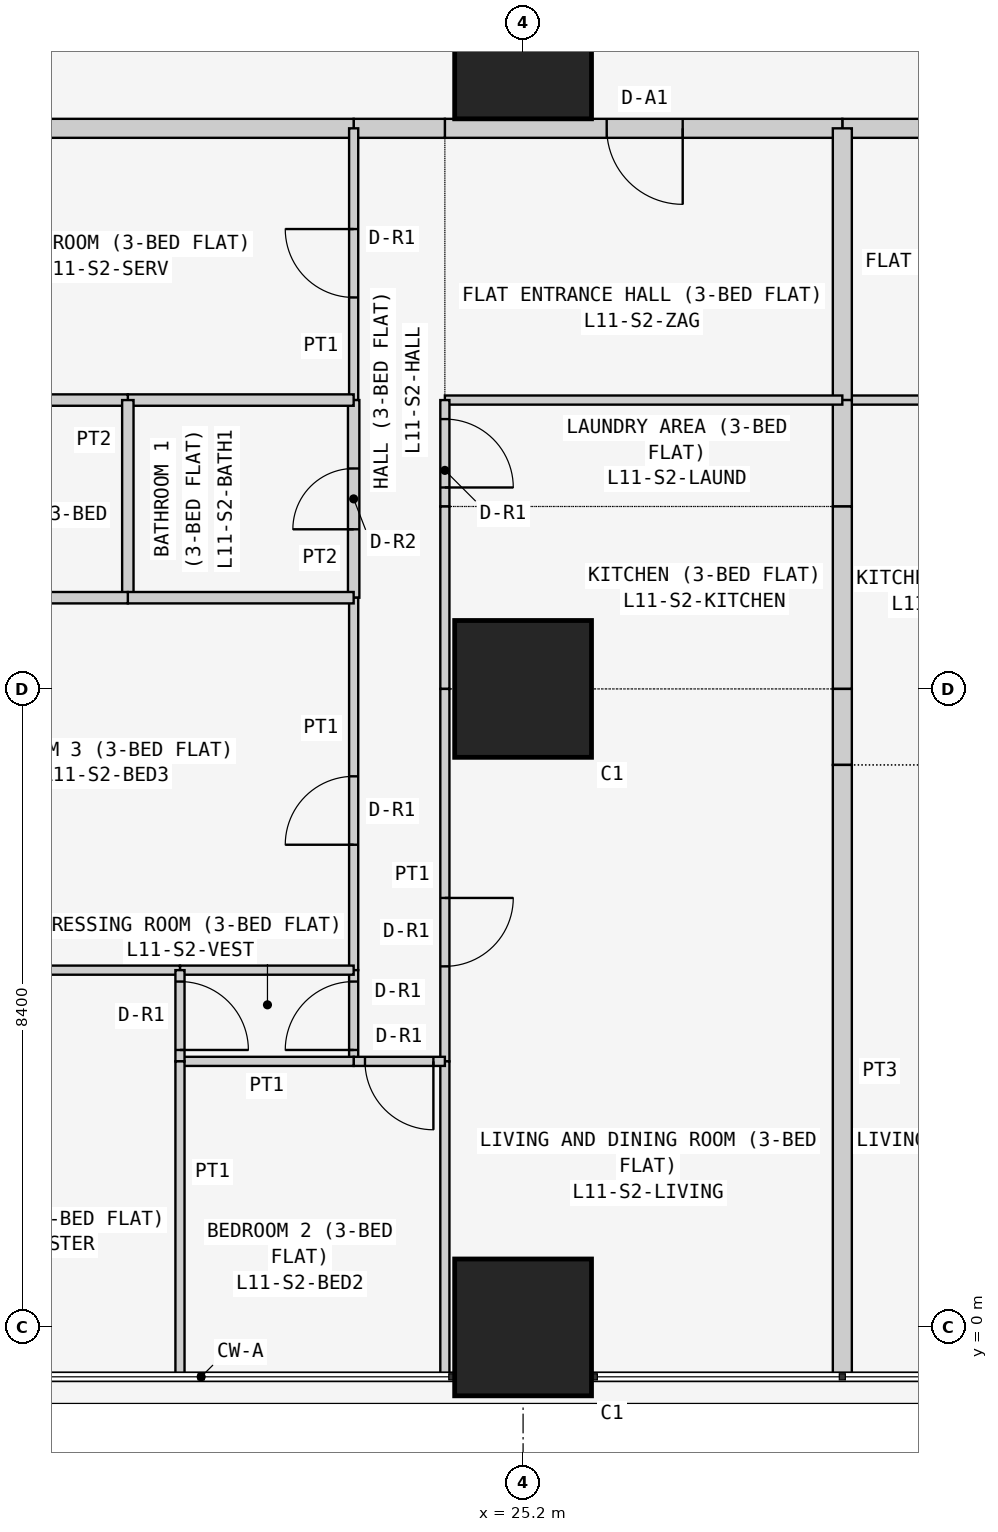
"""IFC4 building model, lengths in metres.
Left out: names, types, materials, properties, quantities, classifications, styles, units other than length and angle.
Written with IfcOpenShell. Run it as: python <this file> out.ifc"""

import sys

from ifc_helpers import new_model, si_unit, direction, frame, frame_2d, origin, origin_2d, place, context, subcontext, project, spatial, rectangle, extrude, element, fill, save


model = new_model("IFC4")
c1 = context("Model", 3, precision=1e-05, world=origin(), true_north=direction((0.0, 1.0)))
c2 = subcontext(c1, "Body", "Model", "MODEL_VIEW")
j1 = project(units=[si_unit("LENGTHUNIT", "METRE"), si_unit("PLANEANGLEUNIT", "RADIAN")], contexts=[c1])
p1 = place(None, origin())
s1 = spatial("IfcSite", under=j1, at=p1, CompositionType="ELEMENT")
p2 = place(p1, origin())
s2 = spatial("IfcBuilding", under=s1, at=p2, CompositionType="ELEMENT")
p3 = place(p2, frame((0.0, 0.0, 48.9)))
s3 = spatial("IfcBuildingStorey", under=s2, at=p3, CompositionType="ELEMENT", Elevation=48.9)
for number, where, z_axis, x_axis in (
    (1, (25.2, 0.0, 0.0), (0.0, 0.0, 1.0), (1.0, 0.0, 0.0)),
    (2, (25.2, 8.4, 0.0), (0.0, 0.0, 1.0), (1.0, 0.0, 0.0)),
    (3, (25.2, 16.8, 0.0), (0.0, 0.0, 1.0), (1.0, 0.0, 0.0)),
):
    element("IfcColumn", number, at=place(p3, frame(where, z_axis=z_axis, x_axis=x_axis)), inside=s3, PredefinedType="COLUMN", context=c2, shape_type="SweptSolid", body=[
        extrude(rectangle(XDim=1.8, YDim=1.8, at=origin_2d()), origin(), (0.0, 0.0, 1.0), 3.6),
    ])
p4 = place(p3, frame((34.629, 15.775, 0.0), z_axis=(0.0, 0.0, 1.0), x_axis=(-1.0, 0.0, 0.0)))
e4 = element("IfcWall", 4, at=p4, inside=s3, PredefinedType="PARTITIONING", context=c2, shape_type="SweptSolid", body=[
    extrude(rectangle(XDim=5.229, YDim=0.25, at=frame_2d((2.615, 0.0))), origin(), (0.0, 0.0, 1.0), 3.45),
])
p5 = place(p4, frame((2.129, 0.0, 0.0)))
e5 = element("IfcOpeningElement", 5, at=p5, cuts=e4, PredefinedType="OPENING", context=c2, shape_type="SweptSolid", body=[
    extrude(rectangle(XDim=1.0, YDim=2.1, at=frame_2d((0.5, 1.05))), frame((0.0, 0.135, 0.0), z_axis=(0.0, -1.0, 0.0), x_axis=(1.0, 0.0, 0.0)), (0.0, 0.0, 1.0), 0.27),
])
p6 = place(p3, frame((29.4, 15.775, 0.0), z_axis=(0.0, 0.0, 1.0), x_axis=(-1.0, 0.0, 0.0)))
e6 = element("IfcWall", 6, at=p6, inside=s3, PredefinedType="PARTITIONING", context=c2, shape_type="SweptSolid", body=[
    extrude(rectangle(XDim=5.229, YDim=0.25, at=frame_2d((2.615, 0.0))), origin(), (0.0, 0.0, 1.0), 3.45),
])
p7 = place(p6, frame((2.1, 0.0, 0.0)))
e7 = element("IfcOpeningElement", 7, at=p7, cuts=e6, PredefinedType="OPENING", context=c2, shape_type="SweptSolid", body=[
    extrude(rectangle(XDim=1.0, YDim=2.1, at=frame_2d((0.5, 1.05))), frame((0.0, 0.135, 0.0), z_axis=(0.0, -1.0, 0.0), x_axis=(1.0, 0.0, 0.0)), (0.0, 0.0, 1.0), 0.27),
])
p8 = place(p3, frame((24.171, 15.775, 0.0), z_axis=(0.0, 0.0, 1.0), x_axis=(-1.0, 0.0, 0.0)))
e8 = element("IfcWall", 8, at=p8, inside=s3, PredefinedType="PARTITIONING", context=c2, shape_type="SweptSolid", body=[
    extrude(rectangle(XDim=1.2, YDim=0.25, at=frame_2d((0.6, 0.0))), origin(), (0.0, 0.0, 1.0), 3.45),
])
p9 = place(p3, frame((22.971, 15.775, 0.0), z_axis=(0.0, 0.0, 1.0), x_axis=(-1.0, 0.0, 0.0)))
e9 = element("IfcWall", 9, at=p9, inside=s3, PredefinedType="PARTITIONING", context=c2, shape_type="SweptSolid", body=[
    extrude(rectangle(XDim=6.871, YDim=0.25, at=frame_2d((3.436, 0.0))), origin(), (0.0, 0.0, 1.0), 3.45),
])
p10 = place(p3, frame((29.4, 12.2, 0.0), z_axis=(0.0, 0.0, 1.0), x_axis=(1.0, 0.0, 0.0)))
e10 = element("IfcWall", 10, at=p10, inside=s3, PredefinedType="PARTITIONING", context=c2, shape_type="SweptSolid", body=[
    extrude(rectangle(XDim=5.229, YDim=0.12, at=frame_2d((2.615, 0.0))), origin(), (0.0, 0.0, 1.0), 3.45),
])
p11 = place(p10, frame((1.05, 0.0, 0.0)))
e11 = element("IfcOpeningElement", 11, at=p11, cuts=e10, PredefinedType="OPENING", context=c2, shape_type="SweptSolid", body=[
    extrude(rectangle(XDim=0.9, YDim=2.1, at=frame_2d((0.45, 1.05))), frame((0.0, 0.07, 0.0), z_axis=(0.0, -1.0, 0.0), x_axis=(1.0, 0.0, 0.0)), (0.0, 0.0, 1.0), 0.14),
])
p12 = place(p3, frame((29.4, 15.775, 0.0), z_axis=(0.0, 0.0, 1.0), x_axis=(0.0, -1.0, 0.0)))
e12 = element("IfcWall", 12, at=p12, inside=s3, PredefinedType="PARTITIONING", context=c2, shape_type="SweptSolid", body=[
    extrude(rectangle(XDim=3.575, YDim=0.25, at=frame_2d((1.788, 0.0))), origin(), (0.0, 0.0, 1.0), 2.848),
])
p13 = place(p3, frame((29.4, 12.2, 0.0), z_axis=(0.0, 0.0, 1.0), x_axis=(0.0, -1.0, 0.0)))
e13 = element("IfcWall", 13, at=p13, inside=s3, PredefinedType="PARTITIONING", context=c2, shape_type="SweptSolid", body=[
    extrude(rectangle(XDim=1.4, YDim=0.25, at=frame_2d((0.7, 0.0))), origin(), (0.0, 0.0, 1.0), 2.848),
])
p14 = place(p3, frame((29.4, 10.8, 0.0), z_axis=(0.0, 0.0, 1.0), x_axis=(0.0, -1.0, 0.0)))
e14 = element("IfcWall", 14, at=p14, inside=s3, PredefinedType="PARTITIONING", context=c2, shape_type="SweptSolid", body=[
    extrude(rectangle(XDim=2.4, YDim=0.25, at=frame_2d((1.2, 0.0))), origin(), (0.0, 0.0, 1.0), 2.848),
])
p15 = place(p3, frame((29.4, 8.4, 0.0), z_axis=(0.0, 0.0, 1.0), x_axis=(0.0, -1.0, 0.0)))
e15 = element("IfcWall", 15, at=p15, inside=s3, PredefinedType="PARTITIONING", context=c2, shape_type="SweptSolid", body=[
    extrude(rectangle(XDim=1.0, YDim=0.25, at=frame_2d((0.5, 0.0))), origin(), (0.0, 0.0, 1.0), 2.848),
])
p16 = place(p3, frame((29.4, 7.4, 0.0), z_axis=(0.0, 0.0, 1.0), x_axis=(0.0, -1.0, 0.0)))
e16 = element("IfcWall", 16, at=p16, inside=s3, PredefinedType="PARTITIONING", context=c2, shape_type="SweptSolid", body=[
    extrude(rectangle(XDim=8.05, YDim=0.25, at=frame_2d((4.025, 0.0))), origin(), (0.0, 0.0, 1.0), 2.848),
])
p17 = place(p3, frame((29.4, 12.2, 0.0), z_axis=(0.0, 0.0, 1.0), x_axis=(-1.0, 0.0, 0.0)))
e17 = element("IfcWall", 17, at=p17, inside=s3, PredefinedType="PARTITIONING", context=c2, shape_type="SweptSolid", body=[
    extrude(rectangle(XDim=5.229, YDim=0.12, at=frame_2d((2.615, 0.0))), origin(), (0.0, 0.0, 1.0), 3.45),
])
p18 = place(p3, frame((24.171, 10.8, 0.0), z_axis=(0.0, 0.0, 1.0), x_axis=(0.0, 1.0, 0.0)))
e18 = element("IfcWall", 18, at=p18, inside=s3, PredefinedType="PARTITIONING", context=c2, shape_type="SweptSolid", body=[
    extrude(rectangle(XDim=1.4, YDim=0.12, at=frame_2d((0.7, 0.0))), origin(), (0.0, 0.0, 1.0), 3.45),
])
p19 = place(p18, frame((0.25, 0.0, 0.0)))
e19 = element("IfcOpeningElement", 19, at=p19, cuts=e18, PredefinedType="OPENING", context=c2, shape_type="SweptSolid", body=[
    extrude(rectangle(XDim=0.9, YDim=2.1, at=frame_2d((0.45, 1.05))), frame((0.0, 0.07, 0.0), z_axis=(0.0, -1.0, 0.0), x_axis=(1.0, 0.0, 0.0)), (0.0, 0.0, 1.0), 0.14),
])
p20 = place(p3, frame((24.171, 8.4, 0.0), z_axis=(0.0, 0.0, 1.0), x_axis=(0.0, 1.0, 0.0)))
e20 = element("IfcWall", 20, at=p20, inside=s3, PredefinedType="PARTITIONING", context=c2, shape_type="SweptSolid", body=[
    extrude(rectangle(XDim=2.4, YDim=0.12, at=frame_2d((1.2, 0.0))), origin(), (0.0, 0.0, 1.0), 3.45),
])
p21 = place(p3, frame((24.171, 3.5, 0.0), z_axis=(0.0, 0.0, 1.0), x_axis=(0.0, 1.0, 0.0)))
e21 = element("IfcWall", 21, at=p21, inside=s3, PredefinedType="PARTITIONING", context=c2, shape_type="SweptSolid", body=[
    extrude(rectangle(XDim=4.9, YDim=0.12, at=frame_2d((2.45, 0.0))), origin(), (0.0, 0.0, 1.0), 3.45),
])
p22 = place(p21, frame((1.25, 0.0, 0.0)))
e22 = element("IfcOpeningElement", 22, at=p22, cuts=e21, PredefinedType="OPENING", context=c2, shape_type="SweptSolid", body=[
    extrude(rectangle(XDim=0.9, YDim=2.1, at=frame_2d((0.45, 1.05))), frame((0.0, 0.07, 0.0), z_axis=(0.0, -1.0, 0.0), x_axis=(1.0, 0.0, 0.0)), (0.0, 0.0, 1.0), 0.14),
])
p23 = place(p3, frame((24.171, -0.65, 0.0), z_axis=(0.0, 0.0, 1.0), x_axis=(0.0, 1.0, 0.0)))
e23 = element("IfcWall", 23, at=p23, inside=s3, PredefinedType="PARTITIONING", context=c2, shape_type="SweptSolid", body=[
    extrude(rectangle(XDim=4.15, YDim=0.12, at=frame_2d((2.075, 0.0))), origin(), (0.0, 0.0, 1.0), 3.45),
])
p24 = place(p3, frame((22.971, 12.2, 0.0), z_axis=(0.0, 0.0, 1.0), x_axis=(0.0, 1.0, 0.0)))
e24 = element("IfcWall", 24, at=p24, inside=s3, PredefinedType="PARTITIONING", context=c2, shape_type="SweptSolid", body=[
    extrude(rectangle(XDim=3.575, YDim=0.12, at=frame_2d((1.788, 0.0))), origin(), (0.0, 0.0, 1.0), 3.45),
])
p25 = place(p24, frame((1.35, 0.0, 0.0)))
e25 = element("IfcOpeningElement", 25, at=p25, cuts=e24, PredefinedType="OPENING", context=c2, shape_type="SweptSolid", body=[
    extrude(rectangle(XDim=0.9, YDim=2.1, at=frame_2d((0.45, 1.05))), frame((0.0, 0.07, 0.0), z_axis=(0.0, -1.0, 0.0), x_axis=(1.0, 0.0, 0.0)), (0.0, 0.0, 1.0), 0.14),
])
p26 = place(p3, frame((22.971, 9.6, 0.0), z_axis=(0.0, 0.0, 1.0), x_axis=(0.0, 1.0, 0.0)))
e26 = element("IfcWall", 26, at=p26, inside=s3, PredefinedType="PARTITIONING", context=c2, shape_type="SweptSolid", body=[
    extrude(rectangle(XDim=2.6, YDim=0.15, at=frame_2d((1.3, 0.0))), origin(), (0.0, 0.0, 1.0), 3.45),
])
p27 = place(p26, frame((0.9, 0.0, 0.0)))
e27 = element("IfcOpeningElement", 27, at=p27, cuts=e26, PredefinedType="OPENING", context=c2, shape_type="SweptSolid", body=[
    extrude(rectangle(XDim=0.8, YDim=2.1, at=frame_2d((0.4, 1.05))), frame((0.0, 0.085, 0.0), z_axis=(0.0, -1.0, 0.0), x_axis=(1.0, 0.0, 0.0)), (0.0, 0.0, 1.0), 0.17),
])
p28 = place(p3, frame((22.971, 4.7, 0.0), z_axis=(0.0, 0.0, 1.0), x_axis=(0.0, 1.0, 0.0)))
e28 = element("IfcWall", 28, at=p28, inside=s3, PredefinedType="PARTITIONING", context=c2, shape_type="SweptSolid", body=[
    extrude(rectangle(XDim=4.9, YDim=0.12, at=frame_2d((2.45, 0.0))), origin(), (0.0, 0.0, 1.0), 3.45),
])
p29 = place(p28, frame((1.65, 0.0, 0.0)))
e29 = element("IfcOpeningElement", 29, at=p29, cuts=e28, PredefinedType="OPENING", context=c2, shape_type="SweptSolid", body=[
    extrude(rectangle(XDim=0.9, YDim=2.1, at=frame_2d((0.45, 1.05))), frame((0.0, 0.07, 0.0), z_axis=(0.0, -1.0, 0.0), x_axis=(1.0, 0.0, 0.0)), (0.0, 0.0, 1.0), 0.14),
])
p30 = place(p3, frame((22.971, 3.5, 0.0), z_axis=(0.0, 0.0, 1.0), x_axis=(0.0, 1.0, 0.0)))
e30 = element("IfcWall", 30, at=p30, inside=s3, PredefinedType="PARTITIONING", context=c2, shape_type="SweptSolid", body=[
    extrude(rectangle(XDim=1.2, YDim=0.12, at=frame_2d((0.6, 0.0))), origin(), (0.0, 0.0, 1.0), 3.45),
])
p31 = place(p30, frame((0.15, 0.0, 0.0)))
e31 = element("IfcOpeningElement", 31, at=p31, cuts=e30, PredefinedType="OPENING", context=c2, shape_type="SweptSolid", body=[
    extrude(rectangle(XDim=0.9, YDim=2.1, at=frame_2d((0.45, 1.05))), frame((0.0, 0.07, 0.0), z_axis=(0.0, -1.0, 0.0), x_axis=(1.0, 0.0, 0.0)), (0.0, 0.0, 1.0), 0.14),
])
p32 = place(p3, frame((24.171, 3.5, 0.0), z_axis=(0.0, 0.0, 1.0), x_axis=(-1.0, 0.0, 0.0)))
e32 = element("IfcWall", 32, at=p32, inside=s3, PredefinedType="PARTITIONING", context=c2, shape_type="SweptSolid", body=[
    extrude(rectangle(XDim=1.2, YDim=0.12, at=frame_2d((0.6, 0.0))), origin(), (0.0, 0.0, 1.0), 3.45),
])
p33 = place(p32, frame((0.151, 0.0, 0.0)))
e33 = element("IfcOpeningElement", 33, at=p33, cuts=e32, PredefinedType="OPENING", context=c2, shape_type="SweptSolid", body=[
    extrude(rectangle(XDim=0.9, YDim=2.1, at=frame_2d((0.45, 1.05))), frame((0.0, 0.07, 0.0), z_axis=(0.0, -1.0, 0.0), x_axis=(1.0, 0.0, 0.0)), (0.0, 0.0, 1.0), 0.14),
])
p34 = place(p3, frame((22.971, 12.2, 0.0), z_axis=(0.0, 0.0, 1.0), x_axis=(-1.0, 0.0, 0.0)))
e34 = element("IfcWall", 34, at=p34, inside=s3, PredefinedType="PARTITIONING", context=c2, shape_type="SweptSolid", body=[
    extrude(rectangle(XDim=2.971, YDim=0.15, at=frame_2d((1.485, 0.0))), origin(), (0.0, 0.0, 1.0), 3.45),
])
p35 = place(p3, frame((20.0, 12.2, 0.0), z_axis=(0.0, 0.0, 1.0), x_axis=(-1.0, 0.0, 0.0)))
e35 = element("IfcWall", 35, at=p35, inside=s3, PredefinedType="PARTITIONING", context=c2, shape_type="SweptSolid", body=[
    extrude(rectangle(XDim=3.9, YDim=0.15, at=frame_2d((1.95, 0.0))), origin(), (0.0, 0.0, 1.0), 3.45),
])
p36 = place(p35, frame((1.45, 0.0, 0.0)))
e36 = element("IfcOpeningElement", 36, at=p36, cuts=e35, PredefinedType="OPENING", context=c2, shape_type="SweptSolid", body=[
    extrude(rectangle(XDim=0.8, YDim=2.1, at=frame_2d((0.4, 1.05))), frame((0.0, 0.085, 0.0), z_axis=(0.0, -1.0, 0.0), x_axis=(1.0, 0.0, 0.0)), (0.0, 0.0, 1.0), 0.17),
])
p37 = place(p3, frame((20.0, 9.6, 0.0), z_axis=(0.0, 0.0, 1.0), x_axis=(0.0, 1.0, 0.0)))
e37 = element("IfcWall", 37, at=p37, inside=s3, PredefinedType="PARTITIONING", context=c2, shape_type="SweptSolid", body=[
    extrude(rectangle(XDim=2.6, YDim=0.15, at=frame_2d((1.3, 0.0))), origin(), (0.0, 0.0, 1.0), 3.45),
])
p38 = place(p3, frame((22.971, 9.6, 0.0), z_axis=(0.0, 0.0, 1.0), x_axis=(-1.0, 0.0, 0.0)))
e38 = element("IfcWall", 38, at=p38, inside=s3, PredefinedType="PARTITIONING", context=c2, shape_type="SweptSolid", body=[
    extrude(rectangle(XDim=2.971, YDim=0.15, at=frame_2d((1.485, 0.0))), origin(), (0.0, 0.0, 1.0), 3.45),
])
p39 = place(p3, frame((20.0, 9.6, 0.0), z_axis=(0.0, 0.0, 1.0), x_axis=(-1.0, 0.0, 0.0)))
e39 = element("IfcWall", 39, at=p39, inside=s3, PredefinedType="PARTITIONING", context=c2, shape_type="SweptSolid", body=[
    extrude(rectangle(XDim=3.9, YDim=0.15, at=frame_2d((1.95, 0.0))), origin(), (0.0, 0.0, 1.0), 3.45),
])
p40 = place(p3, frame((22.971, 4.7, 0.0), z_axis=(0.0, 0.0, 1.0), x_axis=(-1.0, 0.0, 0.0)))
e40 = element("IfcWall", 40, at=p40, inside=s3, PredefinedType="PARTITIONING", context=c2, shape_type="SweptSolid", body=[
    extrude(rectangle(XDim=2.285, YDim=0.12, at=frame_2d((1.143, 0.0))), origin(), (0.0, 0.0, 1.0), 3.45),
])
p41 = place(p3, frame((20.686, 4.7, 0.0), z_axis=(0.0, 0.0, 1.0), x_axis=(-1.0, 0.0, 0.0)))
e41 = element("IfcWall", 41, at=p41, inside=s3, PredefinedType="PARTITIONING", context=c2, shape_type="SweptSolid", body=[
    extrude(rectangle(XDim=4.586, YDim=0.12, at=frame_2d((2.293, 0.0))), origin(), (0.0, 0.0, 1.0), 3.45),
])
p42 = place(p3, frame((22.971, 3.5, 0.0), z_axis=(0.0, 0.0, 1.0), x_axis=(-1.0, 0.0, 0.0)))
e42 = element("IfcWall", 42, at=p42, inside=s3, PredefinedType="PARTITIONING", context=c2, shape_type="SweptSolid", body=[
    extrude(rectangle(XDim=2.285, YDim=0.12, at=frame_2d((1.143, 0.0))), origin(), (0.0, 0.0, 1.0), 3.45),
])
p43 = place(p3, frame((20.686, 3.5, 0.0), z_axis=(0.0, 0.0, 1.0), x_axis=(0.0, 1.0, 0.0)))
e43 = element("IfcWall", 43, at=p43, inside=s3, PredefinedType="PARTITIONING", context=c2, shape_type="SweptSolid", body=[
    extrude(rectangle(XDim=1.2, YDim=0.12, at=frame_2d((0.6, 0.0))), origin(), (0.0, 0.0, 1.0), 3.45),
])
p44 = place(p43, frame((0.15, 0.0, 0.0)))
e44 = element("IfcOpeningElement", 44, at=p44, cuts=e43, PredefinedType="OPENING", context=c2, shape_type="SweptSolid", body=[
    extrude(rectangle(XDim=0.9, YDim=2.1, at=frame_2d((0.45, 1.05))), frame((0.0, 0.07, 0.0), z_axis=(0.0, -1.0, 0.0), x_axis=(1.0, 0.0, 0.0)), (0.0, 0.0, 1.0), 0.14),
])
p45 = place(p3, frame((20.686, -0.65, 0.0), z_axis=(0.0, 0.0, 1.0), x_axis=(0.0, 1.0, 0.0)))
e45 = element("IfcWall", 45, at=p45, inside=s3, PredefinedType="PARTITIONING", context=c2, shape_type="SweptSolid", body=[
    extrude(rectangle(XDim=4.15, YDim=0.12, at=frame_2d((2.075, 0.0))), origin(), (0.0, 0.0, 1.0), 3.45),
])
p46 = place(p7, origin())
e46 = element("IfcDoor", 46, at=p46, inside=s3, OperationType="SINGLE_SWING_LEFT", PredefinedType="DOOR", context=c2, shape_type="SweptSolid", body=[
    extrude(rectangle(XDim=1.0, YDim=2.1, at=frame_2d((0.5, 1.05))), frame((0.0, 0.025, 0.0), z_axis=(0.0, -1.0, 0.0), x_axis=(1.0, 0.0, 0.0)), (0.0, 0.0, 1.0), 0.05),
])
fill(e7, e46)
p47 = place(p19, frame((0.9, 0.0, 0.0), z_axis=(0.0, 0.0, 1.0), x_axis=(-1.0, 0.0, 0.0)))
e47 = element("IfcDoor", 47, at=p47, inside=s3, OperationType="SINGLE_SWING_RIGHT", PredefinedType="DOOR", context=c2, shape_type="SweptSolid", body=[
    extrude(rectangle(XDim=0.9, YDim=2.1, at=frame_2d((0.45, 1.05))), frame((0.0, 0.025, 0.0), z_axis=(0.0, -1.0, 0.0), x_axis=(1.0, 0.0, 0.0)), (0.0, 0.0, 1.0), 0.05),
])
fill(e19, e47)
p48 = place(p22, frame((0.9, 0.0, 0.0), z_axis=(0.0, 0.0, 1.0), x_axis=(-1.0, 0.0, 0.0)))
e48 = element("IfcDoor", 48, at=p48, inside=s3, OperationType="SINGLE_SWING_LEFT", PredefinedType="DOOR", context=c2, shape_type="SweptSolid", body=[
    extrude(rectangle(XDim=0.9, YDim=2.1, at=frame_2d((0.45, 1.05))), frame((0.0, 0.025, 0.0), z_axis=(0.0, -1.0, 0.0), x_axis=(1.0, 0.0, 0.0)), (0.0, 0.0, 1.0), 0.05),
])
fill(e22, e48)
p49 = place(p25, origin())
e49 = element("IfcDoor", 49, at=p49, inside=s3, OperationType="SINGLE_SWING_RIGHT", PredefinedType="DOOR", context=c2, shape_type="SweptSolid", body=[
    extrude(rectangle(XDim=0.9, YDim=2.1, at=frame_2d((0.45, 1.05))), frame((0.0, 0.025, 0.0), z_axis=(0.0, -1.0, 0.0), x_axis=(1.0, 0.0, 0.0)), (0.0, 0.0, 1.0), 0.05),
])
fill(e25, e49)
p50 = place(p27, origin())
e50 = element("IfcDoor", 50, at=p50, inside=s3, OperationType="SINGLE_SWING_LEFT", PredefinedType="DOOR", context=c2, shape_type="SweptSolid", body=[
    extrude(rectangle(XDim=0.8, YDim=2.1, at=frame_2d((0.4, 1.05))), frame((0.0, 0.025, 0.0), z_axis=(0.0, -1.0, 0.0), x_axis=(1.0, 0.0, 0.0)), (0.0, 0.0, 1.0), 0.05),
])
fill(e27, e50)
p51 = place(p29, origin())
e51 = element("IfcDoor", 51, at=p51, inside=s3, OperationType="SINGLE_SWING_LEFT", PredefinedType="DOOR", context=c2, shape_type="SweptSolid", body=[
    extrude(rectangle(XDim=0.9, YDim=2.1, at=frame_2d((0.45, 1.05))), frame((0.0, 0.025, 0.0), z_axis=(0.0, -1.0, 0.0), x_axis=(1.0, 0.0, 0.0)), (0.0, 0.0, 1.0), 0.05),
])
fill(e29, e51)
p52 = place(p31, origin())
e52 = element("IfcDoor", 52, at=p52, inside=s3, OperationType="SINGLE_SWING_LEFT", PredefinedType="DOOR", context=c2, shape_type="SweptSolid", body=[
    extrude(rectangle(XDim=0.9, YDim=2.1, at=frame_2d((0.45, 1.05))), frame((0.0, 0.025, 0.0), z_axis=(0.0, -1.0, 0.0), x_axis=(1.0, 0.0, 0.0)), (0.0, 0.0, 1.0), 0.05),
])
fill(e31, e52)
p53 = place(p44, frame((0.9, 0.0, 0.0), z_axis=(0.0, 0.0, 1.0), x_axis=(-1.0, 0.0, 0.0)))
e53 = element("IfcDoor", 53, at=p53, inside=s3, OperationType="SINGLE_SWING_RIGHT", PredefinedType="DOOR", context=c2, shape_type="SweptSolid", body=[
    extrude(rectangle(XDim=0.9, YDim=2.1, at=frame_2d((0.45, 1.05))), frame((0.0, 0.025, 0.0), z_axis=(0.0, -1.0, 0.0), x_axis=(1.0, 0.0, 0.0)), (0.0, 0.0, 1.0), 0.05),
])
fill(e44, e53)
p54 = place(p33, origin())
e54 = element("IfcDoor", 54, at=p54, inside=s3, OperationType="SINGLE_SWING_LEFT", PredefinedType="DOOR", context=c2, shape_type="SweptSolid", body=[
    extrude(rectangle(XDim=0.9, YDim=2.1, at=frame_2d((0.45, 1.05))), frame((0.0, 0.025, 0.0), z_axis=(0.0, -1.0, 0.0), x_axis=(1.0, 0.0, 0.0)), (0.0, 0.0, 1.0), 0.05),
])
fill(e33, e54)
save(model, sys.argv[1])
